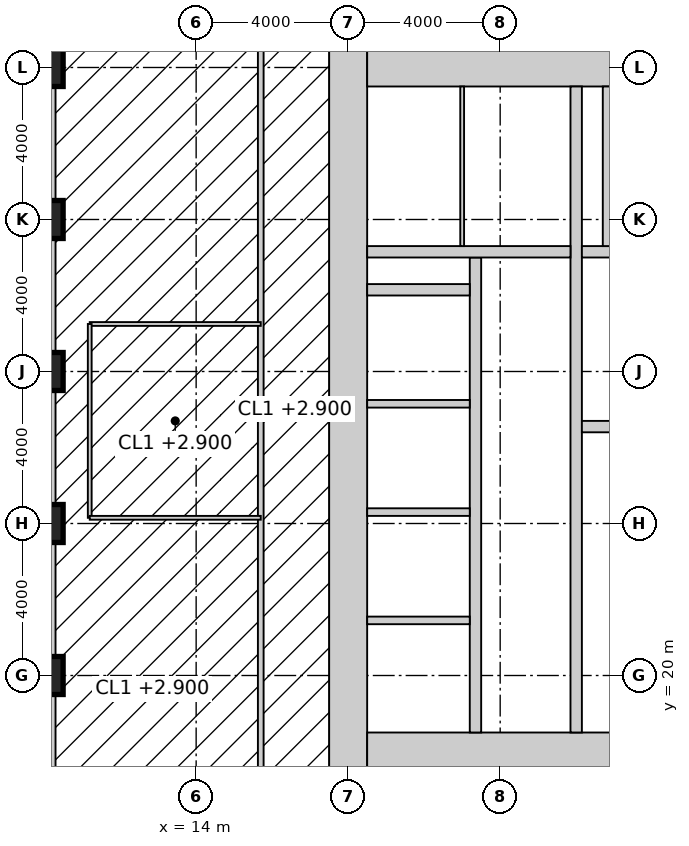
"""IFC4 building model, lengths in metres.
Left out: names, types, materials, properties, quantities, classifications, styles, units other than length and angle.
Written with IfcOpenShell. Run it as: python <this file> out.ifc"""

import sys

from ifc_helpers import new_model, si_unit, direction, frame, frame_2d, origin, origin_2d, place, context, subcontext, project, spatial, rectangle, hollow_rectangle, extrude, element, fill, save


model = new_model("IFC4")
c1 = context("Model", 3, precision=1e-05, world=origin(), true_north=direction((0.0, 1.0)))
c2 = subcontext(c1, "Body", "Model", "MODEL_VIEW")
j1 = project(units=[si_unit("LENGTHUNIT", "METRE"), si_unit("PLANEANGLEUNIT", "RADIAN")], contexts=[c1])
p1 = place(None, origin())
s1 = spatial("IfcSite", under=j1, at=p1, CompositionType="ELEMENT")
p2 = place(p1, origin())
s2 = spatial("IfcBuilding", under=s1, at=p2, CompositionType="ELEMENT")
p3 = place(p2, frame((0.0, 0.0, 254.2)))
s3 = spatial("IfcBuildingStorey", under=s2, at=p3, CompositionType="ELEMENT", Elevation=254.2)
for number, where, z_axis, x_axis in (
    (1, (10.0, 20.0, 0.0), (0.0, 0.0, 1.0), (1.0, 0.0, 0.0)),
    (2, (10.0, 24.0, 0.0), (0.0, 0.0, 1.0), (1.0, 0.0, 0.0)),
    (3, (10.0, 28.0, 0.0), (0.0, 0.0, 1.0), (1.0, 0.0, 0.0)),
    (4, (10.0, 32.0, 0.0), (0.0, 0.0, 1.0), (1.0, 0.0, 0.0)),
    (5, (10.0, 36.0, 0.0), (0.0, 0.0, 1.0), (1.0, 0.0, 0.0)),
):
    element("IfcColumn", number, at=place(p3, frame(where, z_axis=z_axis, x_axis=x_axis)), inside=s3, PredefinedType="COLUMN", context=c2, shape_type="SweptSolid", body=[
        extrude(hollow_rectangle(XDim=1.0, YDim=1.0, WallThickness=0.1, at=origin_2d()), origin(), (0.0, 0.0, 1.0), 4.0),
    ])
p4 = place(p3, frame((18.0, 17.5, -0.15), z_axis=(0.0, 0.0, 1.0), x_axis=(0.0, 1.0, 0.0)))
e6 = element("IfcWall", 6, at=p4, inside=s3, PredefinedType="SHEAR", context=c2, shape_type="SweptSolid", body=[
    extrude(rectangle(XDim=19.0, YDim=1.0, at=frame_2d((9.5, 0.0))), origin(), (0.0, 0.0, 1.0), 4.0),
])
p5 = place(p3, frame((18.5, 18.0, -0.15), z_axis=(0.0, 0.0, 1.0), x_axis=(1.0, 0.0, 0.0)))
e7 = element("IfcWall", 7, at=p5, inside=s3, PredefinedType="SHEAR", context=c2, shape_type="SweptSolid", body=[
    extrude(rectangle(XDim=17.6, YDim=1.0, at=frame_2d((8.8, 0.0))), origin(), (0.0, 0.0, 1.0), 4.0),
])
p6 = place(p5, frame((3.45, 0.0, 0.15)))
e8 = element("IfcOpeningElement", 8, at=p6, cuts=e7, PredefinedType="OPENING", context=c2, shape_type="SweptSolid", body=[
    extrude(rectangle(XDim=1.5, YDim=2.4, at=frame_2d((0.75, 1.2))), frame((0.0, 0.51, 0.0), z_axis=(0.0, -1.0, 0.0), x_axis=(1.0, 0.0, 0.0)), (0.0, 0.0, 1.0), 1.02),
])
p7 = place(p3, frame((18.5, 36.0, -0.15), z_axis=(0.0, 0.0, 1.0), x_axis=(1.0, 0.0, 0.0)))
e9 = element("IfcWall", 9, at=p7, inside=s3, PredefinedType="SHEAR", context=c2, shape_type="SweptSolid", body=[
    extrude(rectangle(XDim=17.6, YDim=1.0, at=frame_2d((8.8, 0.0))), origin(), (0.0, 0.0, 1.0), 4.0),
])
p8 = place(p3, frame((24.0, 18.5, -0.15), z_axis=(0.0, 0.0, 1.0), x_axis=(0.0, 1.0, 0.0)))
e10 = element("IfcWall", 10, at=p8, inside=s3, PredefinedType="SHEAR", context=c2, shape_type="SweptSolid", body=[
    extrude(rectangle(XDim=17.0, YDim=0.3, at=frame_2d((8.5, 0.0))), origin(), (0.0, 0.0, 1.0), 4.0),
])
p9 = place(p8, frame((9.6, 0.0, 0.15)))
e11 = element("IfcOpeningElement", 11, at=p9, cuts=e10, PredefinedType="OPENING", context=c2, shape_type="SweptSolid", body=[
    extrude(rectangle(XDim=1.5, YDim=2.4, at=frame_2d((0.75, 1.2))), frame((0.0, 0.16, 0.0), z_axis=(0.0, -1.0, 0.0), x_axis=(1.0, 0.0, 0.0)), (0.0, 0.0, 1.0), 0.32),
])
p10 = place(p3, frame((24.15, 26.55, -0.15), z_axis=(0.0, 0.0, 1.0), x_axis=(1.0, 0.0, 0.0)))
e12 = element("IfcWall", 12, at=p10, inside=s3, PredefinedType="SHEAR", context=c2, shape_type="SweptSolid", body=[
    extrude(rectangle(XDim=11.25, YDim=0.3, at=frame_2d((5.625, 0.0))), origin(), (0.0, 0.0, 1.0), 4.0),
])
p11 = place(p10, frame((9.25, 0.0, 0.15)))
e13 = element("IfcOpeningElement", 13, at=p11, cuts=e12, PredefinedType="OPENING", context=c2, shape_type="SweptSolid", body=[
    extrude(rectangle(XDim=1.0, YDim=2.2, at=frame_2d((0.5, 1.1))), frame((0.0, 0.16, 0.0), z_axis=(0.0, -1.0, 0.0), x_axis=(1.0, 0.0, 0.0)), (0.0, 0.0, 1.0), 0.32),
])
p12 = place(p10, frame((4.9, 0.0, 0.15)))
e14 = element("IfcOpeningElement", 14, at=p12, cuts=e12, PredefinedType="OPENING", context=c2, shape_type="SweptSolid", body=[
    extrude(rectangle(XDim=1.5, YDim=2.4, at=frame_2d((0.75, 1.2))), frame((0.0, 0.16, 0.0), z_axis=(0.0, -1.0, 0.0), x_axis=(1.0, 0.0, 0.0)), (0.0, 0.0, 1.0), 0.32),
])
p13 = place(p3, frame((24.15, 31.15, -0.15), z_axis=(0.0, 0.0, 1.0), x_axis=(1.0, 0.0, 0.0)))
e15 = element("IfcWall", 15, at=p13, inside=s3, PredefinedType="SHEAR", context=c2, shape_type="SweptSolid", body=[
    extrude(rectangle(XDim=11.25, YDim=0.3, at=frame_2d((5.625, 0.0))), origin(), (0.0, 0.0, 1.0), 4.0),
])
p14 = place(p13, frame((3.15, 0.0, 0.15)))
e16 = element("IfcOpeningElement", 16, at=p14, cuts=e15, PredefinedType="OPENING", context=c2, shape_type="SweptSolid", body=[
    extrude(rectangle(XDim=1.0, YDim=2.2, at=frame_2d((0.5, 1.1))), frame((0.0, 0.16, 0.0), z_axis=(0.0, -1.0, 0.0), x_axis=(1.0, 0.0, 0.0)), (0.0, 0.0, 1.0), 0.32),
])
p15 = place(p13, frame((7.25, 0.0, 0.15)))
e17 = element("IfcOpeningElement", 17, at=p15, cuts=e15, PredefinedType="OPENING", context=c2, shape_type="SweptSolid", body=[
    extrude(rectangle(XDim=1.4, YDim=2.4, at=frame_2d((0.7, 1.2))), frame((0.0, 0.16, 0.0), z_axis=(0.0, -1.0, 0.0), x_axis=(1.0, 0.0, 0.0)), (0.0, 0.0, 1.0), 0.32),
])
p16 = place(p3, frame((21.35, 18.5, -0.15), z_axis=(0.0, 0.0, 1.0), x_axis=(0.0, 1.0, 0.0)))
e18 = element("IfcWall", 18, at=p16, inside=s3, PredefinedType="SHEAR", context=c2, shape_type="SweptSolid", body=[
    extrude(rectangle(XDim=12.5, YDim=0.3, at=frame_2d((6.25, 0.0))), origin(), (0.0, 0.0, 1.0), 4.0),
])
p17 = place(p16, frame((0.875, 0.0, 0.15)))
e19 = element("IfcOpeningElement", 19, at=p17, cuts=e18, PredefinedType="OPENING", context=c2, shape_type="SweptSolid", body=[
    extrude(rectangle(XDim=1.1, YDim=2.2, at=frame_2d((0.55, 1.1))), frame((0.0, 0.16, 0.0), z_axis=(0.0, -1.0, 0.0), x_axis=(1.0, 0.0, 0.0)), (0.0, 0.0, 1.0), 0.32),
])
p18 = place(p16, frame((3.825, 0.0, 0.15)))
e20 = element("IfcOpeningElement", 20, at=p18, cuts=e18, PredefinedType="OPENING", context=c2, shape_type="SweptSolid", body=[
    extrude(rectangle(XDim=1.1, YDim=2.2, at=frame_2d((0.55, 1.1))), frame((0.0, 0.16, 0.0), z_axis=(0.0, -1.0, 0.0), x_axis=(1.0, 0.0, 0.0)), (0.0, 0.0, 1.0), 0.32),
])
p19 = place(p16, frame((6.675, 0.0, 0.15)))
e21 = element("IfcOpeningElement", 21, at=p19, cuts=e18, PredefinedType="OPENING", context=c2, shape_type="SweptSolid", body=[
    extrude(rectangle(XDim=1.1, YDim=2.2, at=frame_2d((0.55, 1.1))), frame((0.0, 0.16, 0.0), z_axis=(0.0, -1.0, 0.0), x_axis=(1.0, 0.0, 0.0)), (0.0, 0.0, 1.0), 0.32),
])
p20 = place(p16, frame((9.575, 0.0, 0.15)))
e22 = element("IfcOpeningElement", 22, at=p20, cuts=e18, PredefinedType="OPENING", context=c2, shape_type="SweptSolid", body=[
    extrude(rectangle(XDim=1.1, YDim=2.2, at=frame_2d((0.55, 1.1))), frame((0.0, 0.16, 0.0), z_axis=(0.0, -1.0, 0.0), x_axis=(1.0, 0.0, 0.0)), (0.0, 0.0, 1.0), 0.32),
])
p21 = place(p3, frame((18.5, 31.15, -0.15), z_axis=(0.0, 0.0, 1.0), x_axis=(1.0, 0.0, 0.0)))
e23 = element("IfcWall", 23, at=p21, inside=s3, PredefinedType="SHEAR", context=c2, shape_type="SweptSolid", body=[
    extrude(rectangle(XDim=5.35, YDim=0.3, at=frame_2d((2.675, 0.0))), origin(), (0.0, 0.0, 1.0), 4.0),
])
p22 = place(p21, frame((3.4, 0.0, 0.15)))
e24 = element("IfcOpeningElement", 24, at=p22, cuts=e23, PredefinedType="OPENING", context=c2, shape_type="SweptSolid", body=[
    extrude(rectangle(XDim=1.0, YDim=2.2, at=frame_2d((0.5, 1.1))), frame((0.0, 0.16, 0.0), z_axis=(0.0, -1.0, 0.0), x_axis=(1.0, 0.0, 0.0)), (0.0, 0.0, 1.0), 0.32),
])
p23 = place(p3, frame((18.5, 30.15, -0.15), z_axis=(0.0, 0.0, 1.0), x_axis=(1.0, 0.0, 0.0)))
e25 = element("IfcWall", 25, at=p23, inside=s3, PredefinedType="SHEAR", context=c2, shape_type="SweptSolid", body=[
    extrude(rectangle(XDim=2.7, YDim=0.3, at=frame_2d((1.35, 0.0))), origin(), (0.0, 0.0, 1.0), 4.0),
])
p24 = place(p3, frame((24.85, 31.3, -0.15), z_axis=(0.0, 0.0, 1.0), x_axis=(0.0, 1.0, 0.0)))
e26 = element("IfcWall", 26, at=p24, inside=s3, PredefinedType="SHEAR", context=c2, shape_type="SweptSolid", body=[
    extrude(rectangle(XDim=4.2, YDim=0.3, at=frame_2d((2.1, 0.0))), origin(), (0.0, 0.0, 1.0), 4.0),
])
for number, where, z_axis, x_axis in (
    (27, (18.5, 21.45, -0.15), (0.0, 0.0, 1.0), (1.0, 0.0, 0.0)),
    (28, (18.5, 24.3, -0.15), (0.0, 0.0, 1.0), (1.0, 0.0, 0.0)),
    (29, (18.5, 27.15, -0.15), (0.0, 0.0, 1.0), (1.0, 0.0, 0.0)),
):
    element("IfcWall", number, at=place(p3, frame(where, z_axis=z_axis, x_axis=x_axis)), inside=s3, PredefinedType="SOLIDWALL", context=c2, shape_type="SweptSolid", body=[
        extrude(rectangle(XDim=2.7, YDim=0.2, at=frame_2d((1.35, 0.0))), origin(), (0.0, 0.0, 1.0), 4.0),
    ])
p25 = place(p3, frame((21.0, 31.3, 0.0), z_axis=(0.0, 0.0, 1.0), x_axis=(0.0, 1.0, 0.0)))
e30 = element("IfcWall", 30, at=p25, inside=s3, PredefinedType="PARTITIONING", context=c2, shape_type="SweptSolid", body=[
    extrude(rectangle(XDim=4.2, YDim=0.1, at=frame_2d((2.1, 0.0))), origin(), (0.0, 0.0, 1.0), 3.85),
])
p26 = place(p25, frame((1.55, 0.0, 0.0)))
e31 = element("IfcOpeningElement", 31, at=p26, cuts=e30, PredefinedType="OPENING", context=c2, shape_type="SweptSolid", body=[
    extrude(rectangle(XDim=1.0, YDim=2.2, at=frame_2d((0.5, 1.1))), frame((0.0, 0.06, 0.0), z_axis=(0.0, -1.0, 0.0), x_axis=(1.0, 0.0, 0.0)), (0.0, 0.0, 1.0), 0.12),
])
p27 = place(p3, frame((15.7, 15.025, 0.0), z_axis=(0.0, 0.0, 1.0), x_axis=(0.0, 1.0, 0.0)))
e32 = element("IfcWall", 32, at=p27, inside=s3, PredefinedType="PARTITIONING", context=c2, shape_type="SweptSolid", body=[
    extrude(rectangle(XDim=23.35, YDim=0.15, at=frame_2d((11.675, 0.0))), origin(), (0.0, 0.0, 1.0), 3.85),
])
p28 = place(p27, frame((10.775, 0.0, 0.0)))
e33 = element("IfcOpeningElement", 33, at=p28, cuts=e32, PredefinedType="OPENING", context=c2, shape_type="SweptSolid", body=[
    extrude(rectangle(XDim=1.8, YDim=2.4, at=frame_2d((0.9, 1.2))), frame((0.0, 0.085, 0.0), z_axis=(0.0, -1.0, 0.0), x_axis=(1.0, 0.0, 0.0)), (0.0, 0.0, 1.0), 0.17),
])
p29 = place(p3, frame((15.7, 29.25, 0.0), z_axis=(0.0, 0.0, 1.0), x_axis=(-1.0, 0.0, 0.0)))
e34 = element("IfcWall", 34, at=p29, inside=s3, PredefinedType="PARTITIONING", context=c2, shape_type="SweptSolid", body=[
    extrude(rectangle(XDim=4.5, YDim=0.1, at=frame_2d((2.25, 0.0))), origin(), (0.0, 0.0, 1.0), 3.85),
])
p30 = place(p3, frame((11.2, 29.25, 0.0), z_axis=(0.0, 0.0, 1.0), x_axis=(0.0, -1.0, 0.0)))
e35 = element("IfcWall", 35, at=p30, inside=s3, PredefinedType="PARTITIONING", context=c2, shape_type="SweptSolid", body=[
    extrude(rectangle(XDim=5.1, YDim=0.1, at=frame_2d((2.55, 0.0))), origin(), (0.0, 0.0, 1.0), 3.85),
])
p31 = place(p30, frame((2.05, 0.0, 0.0)))
e36 = element("IfcOpeningElement", 36, at=p31, cuts=e35, PredefinedType="OPENING", context=c2, shape_type="SweptSolid", body=[
    extrude(rectangle(XDim=1.0, YDim=2.2, at=frame_2d((0.5, 1.1))), frame((0.0, 0.06, 0.0), z_axis=(0.0, -1.0, 0.0), x_axis=(1.0, 0.0, 0.0)), (0.0, 0.0, 1.0), 0.12),
])
p32 = place(p3, frame((11.2, 24.15, 0.0), z_axis=(0.0, 0.0, 1.0), x_axis=(1.0, 0.0, 0.0)))
e37 = element("IfcWall", 37, at=p32, inside=s3, PredefinedType="PARTITIONING", context=c2, shape_type="SweptSolid", body=[
    extrude(rectangle(XDim=4.5, YDim=0.1, at=frame_2d((2.25, 0.0))), origin(), (0.0, 0.0, 1.0), 2.95),
])
p33 = place(p3, frame((10.15, 19.5, 0.0), z_axis=(0.0, 0.0, 1.0), x_axis=(0.0, -1.0, 0.0)))
e38 = element("IfcWall", 38, at=p33, inside=s3, PredefinedType="ELEMENTEDWALL", context=c2, shape_type="SweptSolid", body=[
    extrude(rectangle(XDim=3.0, YDim=0.3, at=frame_2d((1.5, 0.0))), origin(), (0.0, 0.0, 1.0), 2.85),
])
p34 = place(p33, frame((0.5, 0.0, 0.8)))
e39 = element("IfcOpeningElement", 39, at=p34, cuts=e38, PredefinedType="OPENING", context=c2, shape_type="SweptSolid", body=[
    extrude(rectangle(XDim=2.0, YDim=2.0, at=frame_2d((1.0, 1.0))), frame((0.0, 0.16, 0.0), z_axis=(0.0, -1.0, 0.0), x_axis=(1.0, 0.0, 0.0)), (0.0, 0.0, 1.0), 0.32),
])
p35 = place(p3, frame((10.15, 23.5, 0.0), z_axis=(0.0, 0.0, 1.0), x_axis=(0.0, -1.0, 0.0)))
e40 = element("IfcWall", 40, at=p35, inside=s3, PredefinedType="ELEMENTEDWALL", context=c2, shape_type="SweptSolid", body=[
    extrude(rectangle(XDim=3.0, YDim=0.3, at=frame_2d((1.5, 0.0))), origin(), (0.0, 0.0, 1.0), 2.85),
])
p36 = place(p35, frame((0.5, 0.0, 0.8)))
e41 = element("IfcOpeningElement", 41, at=p36, cuts=e40, PredefinedType="OPENING", context=c2, shape_type="SweptSolid", body=[
    extrude(rectangle(XDim=2.0, YDim=2.0, at=frame_2d((1.0, 1.0))), frame((0.0, 0.16, 0.0), z_axis=(0.0, -1.0, 0.0), x_axis=(1.0, 0.0, 0.0)), (0.0, 0.0, 1.0), 0.32),
])
p37 = place(p3, frame((10.15, 27.5, 0.0), z_axis=(0.0, 0.0, 1.0), x_axis=(0.0, -1.0, 0.0)))
e42 = element("IfcWall", 42, at=p37, inside=s3, PredefinedType="ELEMENTEDWALL", context=c2, shape_type="SweptSolid", body=[
    extrude(rectangle(XDim=3.0, YDim=0.3, at=frame_2d((1.5, 0.0))), origin(), (0.0, 0.0, 1.0), 2.85),
])
p38 = place(p37, frame((0.5, 0.0, 0.8)))
e43 = element("IfcOpeningElement", 43, at=p38, cuts=e42, PredefinedType="OPENING", context=c2, shape_type="SweptSolid", body=[
    extrude(rectangle(XDim=2.0, YDim=2.0, at=frame_2d((1.0, 1.0))), frame((0.0, 0.16, 0.0), z_axis=(0.0, -1.0, 0.0), x_axis=(1.0, 0.0, 0.0)), (0.0, 0.0, 1.0), 0.32),
])
p39 = place(p3, frame((10.15, 31.5, 0.0), z_axis=(0.0, 0.0, 1.0), x_axis=(0.0, -1.0, 0.0)))
e44 = element("IfcWall", 44, at=p39, inside=s3, PredefinedType="ELEMENTEDWALL", context=c2, shape_type="SweptSolid", body=[
    extrude(rectangle(XDim=3.0, YDim=0.3, at=frame_2d((1.5, 0.0))), origin(), (0.0, 0.0, 1.0), 2.85),
])
p40 = place(p39, frame((0.5, 0.0, 0.8)))
e45 = element("IfcOpeningElement", 45, at=p40, cuts=e44, PredefinedType="OPENING", context=c2, shape_type="SweptSolid", body=[
    extrude(rectangle(XDim=2.0, YDim=2.0, at=frame_2d((1.0, 1.0))), frame((0.0, 0.16, 0.0), z_axis=(0.0, -1.0, 0.0), x_axis=(1.0, 0.0, 0.0)), (0.0, 0.0, 1.0), 0.32),
])
p41 = place(p3, frame((10.15, 35.5, 0.0), z_axis=(0.0, 0.0, 1.0), x_axis=(0.0, -1.0, 0.0)))
e46 = element("IfcWall", 46, at=p41, inside=s3, PredefinedType="ELEMENTEDWALL", context=c2, shape_type="SweptSolid", body=[
    extrude(rectangle(XDim=3.0, YDim=0.3, at=frame_2d((1.5, 0.0))), origin(), (0.0, 0.0, 1.0), 2.85),
])
p42 = place(p41, frame((0.5, 0.0, 0.8)))
e47 = element("IfcOpeningElement", 47, at=p42, cuts=e46, PredefinedType="OPENING", context=c2, shape_type="SweptSolid", body=[
    extrude(rectangle(XDim=2.0, YDim=2.0, at=frame_2d((1.0, 1.0))), frame((0.0, 0.16, 0.0), z_axis=(0.0, -1.0, 0.0), x_axis=(1.0, 0.0, 0.0)), (0.0, 0.0, 1.0), 0.32),
])
p43 = place(p9, origin())
e48 = element("IfcDoor", 48, at=p43, inside=s3, OperationType="DOUBLE_DOOR_DOUBLE_SWING", PredefinedType="DOOR", context=c2, shape_type="SweptSolid", body=[
    extrude(rectangle(XDim=1.5, YDim=2.4, at=frame_2d((0.75, 1.2))), frame((0.0, 0.025, 0.0), z_axis=(0.0, -1.0, 0.0), x_axis=(1.0, 0.0, 0.0)), (0.0, 0.0, 1.0), 0.05),
])
fill(e11, e48)
p44 = place(p22, origin())
e49 = element("IfcDoor", 49, at=p44, inside=s3, OperationType="SINGLE_SWING_LEFT", PredefinedType="DOOR", context=c2, shape_type="SweptSolid", body=[
    extrude(rectangle(XDim=1.0, YDim=2.2, at=frame_2d((0.5, 1.1))), frame((0.0, 0.025, 0.0), z_axis=(0.0, -1.0, 0.0), x_axis=(1.0, 0.0, 0.0)), (0.0, 0.0, 1.0), 0.05),
])
fill(e24, e49)
p45 = place(p26, origin())
e50 = element("IfcDoor", 50, at=p45, inside=s3, OperationType="SINGLE_SWING_LEFT", PredefinedType="DOOR", context=c2, shape_type="SweptSolid", body=[
    extrude(rectangle(XDim=1.0, YDim=2.2, at=frame_2d((0.5, 1.1))), frame((0.0, 0.025, 0.0), z_axis=(0.0, -1.0, 0.0), x_axis=(1.0, 0.0, 0.0)), (0.0, 0.0, 1.0), 0.05),
])
fill(e31, e50)
p46 = place(p6, origin())
e51 = element("IfcDoor", 51, at=p46, inside=s3, OperationType="DOUBLE_DOOR_DOUBLE_SWING", PredefinedType="DOOR", context=c2, shape_type="SweptSolid", body=[
    extrude(rectangle(XDim=1.5, YDim=2.4, at=frame_2d((0.75, 1.2))), frame((0.0, 0.025, 0.0), z_axis=(0.0, -1.0, 0.0), x_axis=(1.0, 0.0, 0.0)), (0.0, 0.0, 1.0), 0.05),
])
fill(e8, e51)
p47 = place(p28, origin())
e52 = element("IfcDoor", 52, at=p47, inside=s3, OperationType="DOUBLE_DOOR_DOUBLE_SWING", PredefinedType="DOOR", context=c2, shape_type="SweptSolid", body=[
    extrude(rectangle(XDim=1.8, YDim=2.4, at=frame_2d((0.9, 1.2))), frame((0.0, 0.025, 0.0), z_axis=(0.0, -1.0, 0.0), x_axis=(1.0, 0.0, 0.0)), (0.0, 0.0, 1.0), 0.05),
])
fill(e33, e52)
p48 = place(p31, origin())
e53 = element("IfcDoor", 53, at=p48, inside=s3, OperationType="SINGLE_SWING_RIGHT", PredefinedType="DOOR", context=c2, shape_type="SweptSolid", body=[
    extrude(rectangle(XDim=1.0, YDim=2.2, at=frame_2d((0.5, 1.1))), frame((0.0, 0.025, 0.0), z_axis=(0.0, -1.0, 0.0), x_axis=(1.0, 0.0, 0.0)), (0.0, 0.0, 1.0), 0.05),
])
fill(e36, e53)
p49 = place(p17, origin())
e54 = element("IfcDoor", 54, at=p49, inside=s3, OperationType="DOUBLE_DOOR_SLIDING", PredefinedType="DOOR", context=c2, shape_type="SweptSolid", body=[
    extrude(rectangle(XDim=1.1, YDim=2.2, at=frame_2d((0.55, 1.1))), frame((0.0, 0.025, 0.0), z_axis=(0.0, -1.0, 0.0), x_axis=(1.0, 0.0, 0.0)), (0.0, 0.0, 1.0), 0.05),
])
fill(e19, e54)
p50 = place(p18, origin())
e55 = element("IfcDoor", 55, at=p50, inside=s3, OperationType="DOUBLE_DOOR_SLIDING", PredefinedType="DOOR", context=c2, shape_type="SweptSolid", body=[
    extrude(rectangle(XDim=1.1, YDim=2.2, at=frame_2d((0.55, 1.1))), frame((0.0, 0.025, 0.0), z_axis=(0.0, -1.0, 0.0), x_axis=(1.0, 0.0, 0.0)), (0.0, 0.0, 1.0), 0.05),
])
fill(e20, e55)
p51 = place(p19, origin())
e56 = element("IfcDoor", 56, at=p51, inside=s3, OperationType="DOUBLE_DOOR_SLIDING", PredefinedType="DOOR", context=c2, shape_type="SweptSolid", body=[
    extrude(rectangle(XDim=1.1, YDim=2.2, at=frame_2d((0.55, 1.1))), frame((0.0, 0.025, 0.0), z_axis=(0.0, -1.0, 0.0), x_axis=(1.0, 0.0, 0.0)), (0.0, 0.0, 1.0), 0.05),
])
fill(e21, e56)
p52 = place(p20, origin())
e57 = element("IfcDoor", 57, at=p52, inside=s3, OperationType="DOUBLE_DOOR_SLIDING", PredefinedType="DOOR", context=c2, shape_type="SweptSolid", body=[
    extrude(rectangle(XDim=1.1, YDim=2.2, at=frame_2d((0.55, 1.1))), frame((0.0, 0.025, 0.0), z_axis=(0.0, -1.0, 0.0), x_axis=(1.0, 0.0, 0.0)), (0.0, 0.0, 1.0), 0.05),
])
fill(e22, e57)
save(model, sys.argv[1])
